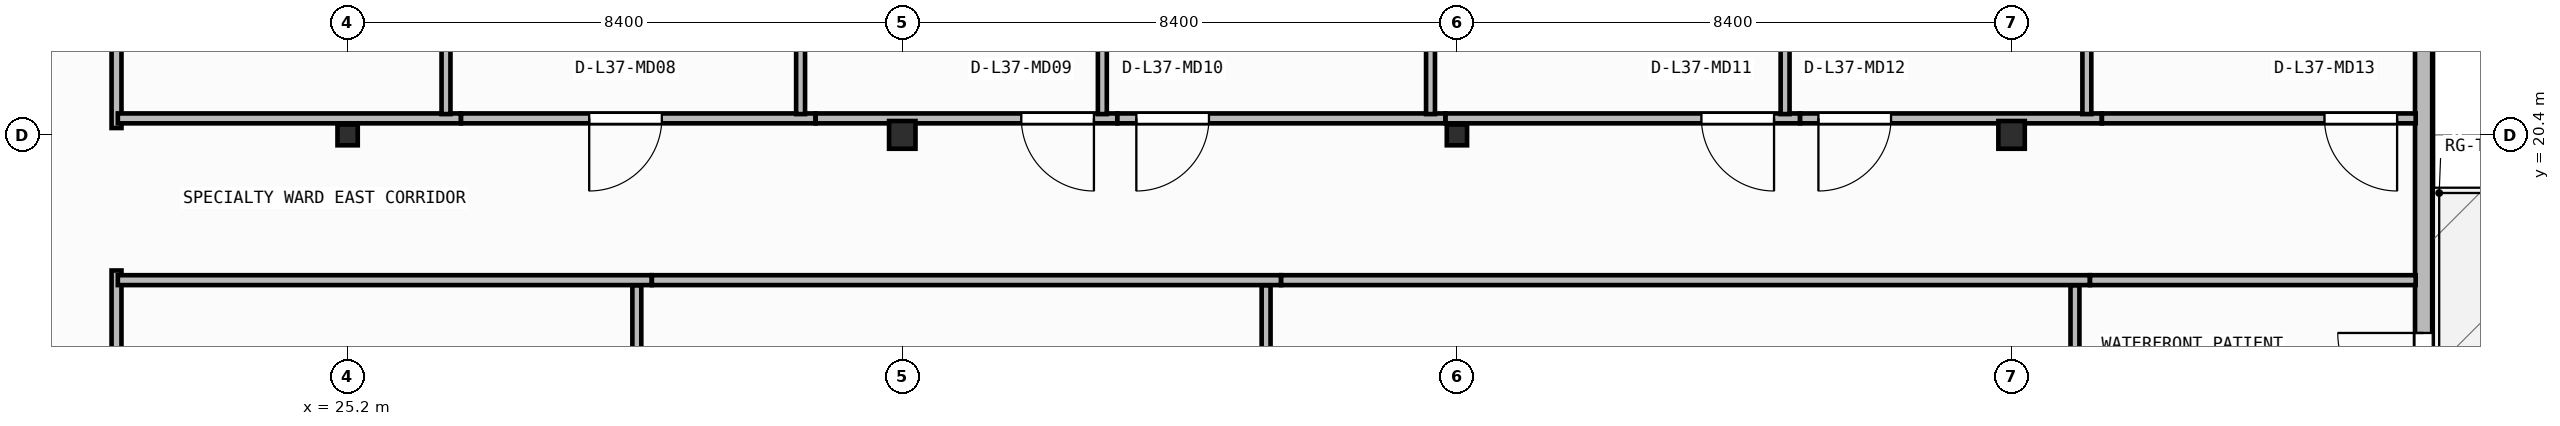
"""IFC4 building model, lengths in metres.
Left out: names, types, materials, properties, quantities, classifications, styles, units other than length and angle.
Written with IfcOpenShell. Run it as: python <this file> out.ifc"""

import sys

from ifc_helpers import new_model, si_unit, direction, frame, frame_2d, origin, origin_2d, place, context, subcontext, project, spatial, rectangle, i_section, extrude, element, fill, save


model = new_model("IFC4")
c1 = context("Model", 3, precision=1e-05, world=origin(), true_north=direction((0.0, 1.0)))
c2 = subcontext(c1, "Body", "Model", "MODEL_VIEW")
j1 = project(units=[si_unit("LENGTHUNIT", "METRE"), si_unit("PLANEANGLEUNIT", "RADIAN")], contexts=[c1])
p1 = place(None, origin())
s1 = spatial("IfcSite", under=j1, at=p1, CompositionType="ELEMENT")
p2 = place(p1, origin())
s2 = spatial("IfcBuilding", under=s1, at=p2, CompositionType="ELEMENT")
p3 = place(p2, frame((0.0, 0.0, 150.75)))
s3 = spatial("IfcBuildingStorey", under=s2, at=p3, CompositionType="ELEMENT", Elevation=150.75)
p4 = place(p3, frame((25.2, 20.4, 0.0), z_axis=(0.0, 0.0, 1.0), x_axis=(1.0, 0.0, 0.0)))
e1 = element("IfcColumn", 1, at=p4, inside=s3, PredefinedType="COLUMN", context=c2, shape_type="SweptSolid", body=[
    extrude(i_section(OverallWidth=0.307, OverallDepth=0.315, WebThickness=0.012, FlangeThickness=0.019, FilletRadius=0.017, at=origin_2d()), origin(), (0.0, 0.0, 1.0), 3.95),
])
p5 = place(p3, frame((33.6, 20.4, 0.0), z_axis=(0.0, 0.0, 1.0), x_axis=(1.0, 0.0, 0.0)))
e2 = element("IfcColumn", 2, at=p5, inside=s3, PredefinedType="COLUMN", context=c2, shape_type="SweptSolid", body=[
    extrude(i_section(OverallWidth=0.4, OverallDepth=0.42, WebThickness=0.025, FlangeThickness=0.04, at=origin_2d()), origin(), (0.0, 0.0, 1.0), 3.95),
])
p6 = place(p3, frame((42.0, 20.4, 0.0), z_axis=(0.0, 0.0, 1.0), x_axis=(1.0, 0.0, 0.0)))
e3 = element("IfcColumn", 3, at=p6, inside=s3, PredefinedType="COLUMN", context=c2, shape_type="SweptSolid", body=[
    extrude(i_section(OverallWidth=0.307, OverallDepth=0.315, WebThickness=0.012, FlangeThickness=0.019, FilletRadius=0.017, at=origin_2d()), origin(), (0.0, 0.0, 1.0), 3.95),
])
p7 = place(p3, frame((50.4, 20.4, 0.0), z_axis=(0.0, 0.0, 1.0), x_axis=(1.0, 0.0, 0.0)))
e4 = element("IfcColumn", 4, at=p7, inside=s3, PredefinedType="COLUMN", context=c2, shape_type="SweptSolid", body=[
    extrude(i_section(OverallWidth=0.4, OverallDepth=0.42, WebThickness=0.025, FlangeThickness=0.04, at=origin_2d()), origin(), (0.0, 0.0, 1.0), 3.95),
])
p8 = place(p3, frame((56.64, 6.86, 0.0), z_axis=(0.0, 0.0, 1.0), x_axis=(0.0, 1.0, 0.0)))
e5 = element("IfcWall", 5, at=p8, inside=s3, PredefinedType="STANDARD", context=c2, shape_type="SweptSolid", body=[
    extrude(rectangle(XDim=23.48, YDim=0.26, at=frame_2d((11.74, 0.0))), origin(), (0.0, 0.0, 1.0), 3.71),
])
p9 = place(p8, frame((9.24, 0.0, 0.0)))
e6 = element("IfcOpeningElement", 6, at=p9, cuts=e5, PredefinedType="OPENING", context=c2, shape_type="SweptSolid", body=[
    extrude(rectangle(XDim=1.3, YDim=2.15, at=frame_2d((0.65, 1.075))), frame((0.0, 0.14, 0.0), z_axis=(0.0, -1.0, 0.0), x_axis=(1.0, 0.0, 0.0)), (0.0, 0.0, 1.0), 0.28),
])
p10 = place(p3, frame((21.7, 14.7, 0.0), z_axis=(0.0, 0.0, 1.0), x_axis=(0.0, 1.0, 0.0)))
e7 = element("IfcWall", 7, at=p10, inside=s3, PredefinedType="PARTITIONING", context=c2, shape_type="SweptSolid", body=[
    extrude(rectangle(XDim=3.646, YDim=0.15, at=frame_2d((1.823, 0.0))), origin(), (0.0, 0.0, 1.0), 3.71),
])
p11 = place(p3, frame((21.7, 20.504, 0.0), z_axis=(0.0, 0.0, 1.0), x_axis=(0.0, 1.0, 0.0)))
e8 = element("IfcWall", 8, at=p11, inside=s3, PredefinedType="PARTITIONING", context=c2, shape_type="SweptSolid", body=[
    extrude(rectangle(XDim=6.756, YDim=0.15, at=frame_2d((3.378, 0.0))), origin(), (0.0, 0.0, 1.0), 3.71),
])
p12 = place(p11, frame((2.828, 0.0, 0.0)))
e9 = element("IfcOpeningElement", 9, at=p12, cuts=e8, PredefinedType="OPENING", context=c2, shape_type="SweptSolid", body=[
    extrude(rectangle(XDim=1.1, YDim=2.1, at=frame_2d((0.55, 1.05))), frame((0.0, 0.085, 0.0), z_axis=(0.0, -1.0, 0.0), x_axis=(1.0, 0.0, 0.0)), (0.0, 0.0, 1.0), 0.17),
])
p13 = place(p3, frame((21.72, 18.2, 0.0), z_axis=(0.0, 0.0, 1.0), x_axis=(1.0, 0.0, 0.0)))
e10 = element("IfcWall", 10, at=p13, inside=s3, PredefinedType="PARTITIONING", context=c2, shape_type="SweptSolid", body=[
    extrude(rectangle(XDim=8.086, YDim=0.15, at=frame_2d((4.043, 0.0))), origin(), (0.0, 0.0, 1.0), 3.71),
])
p14 = place(p3, frame((29.808, 18.2, 0.0), z_axis=(0.0, 0.0, 1.0), x_axis=(1.0, 0.0, 0.0)))
e11 = element("IfcWall", 11, at=p14, inside=s3, PredefinedType="PARTITIONING", context=c2, shape_type="SweptSolid", body=[
    extrude(rectangle(XDim=9.528, YDim=0.15, at=frame_2d((4.764, 0.0))), origin(), (0.0, 0.0, 1.0), 3.71),
])
p15 = place(p3, frame((39.338, 18.2, 0.0), z_axis=(0.0, 0.0, 1.0), x_axis=(1.0, 0.0, 0.0)))
e12 = element("IfcWall", 12, at=p15, inside=s3, PredefinedType="PARTITIONING", context=c2, shape_type="SweptSolid", body=[
    extrude(rectangle(XDim=12.248, YDim=0.15, at=frame_2d((6.124, 0.0))), origin(), (0.0, 0.0, 1.0), 3.71),
])
p16 = place(p3, frame((51.588, 18.2, 0.0), z_axis=(0.0, 0.0, 1.0), x_axis=(1.0, 0.0, 0.0)))
e13 = element("IfcWall", 13, at=p16, inside=s3, PredefinedType="PARTITIONING", context=c2, shape_type="SweptSolid", body=[
    extrude(rectangle(XDim=4.932, YDim=0.15, at=frame_2d((2.466, 0.0))), origin(), (0.0, 0.0, 1.0), 3.71),
])
p17 = place(p3, frame((26.916, 20.65, 0.0), z_axis=(0.0, 0.0, 1.0), x_axis=(-1.0, 0.0, 0.0)))
e14 = element("IfcWall", 14, at=p17, inside=s3, PredefinedType="PARTITIONING", context=c2, shape_type="SweptSolid", body=[
    extrude(rectangle(XDim=5.196, YDim=0.15, at=frame_2d((2.598, 0.0))), origin(), (0.0, 0.0, 1.0), 3.083),
])
p18 = place(p3, frame((32.286, 20.65, 0.0), z_axis=(0.0, 0.0, 1.0), x_axis=(-1.0, 0.0, 0.0)))
e15 = element("IfcWall", 15, at=p18, inside=s3, PredefinedType="PARTITIONING", context=c2, shape_type="SweptSolid", body=[
    extrude(rectangle(XDim=5.368, YDim=0.15, at=frame_2d((2.684, 0.0))), origin(), (0.0, 0.0, 1.0), 3.083),
])
p19 = place(p18, frame((2.327, 0.0, 0.0)))
e16 = element("IfcOpeningElement", 16, at=p19, cuts=e15, PredefinedType="OPENING", context=c2, shape_type="SweptSolid", body=[
    extrude(rectangle(XDim=1.1, YDim=2.1, at=frame_2d((0.55, 1.05))), frame((0.0, 0.085, 0.0), z_axis=(0.0, -1.0, 0.0), x_axis=(1.0, 0.0, 0.0)), (0.0, 0.0, 1.0), 0.17),
])
p20 = place(p3, frame((36.856, 20.65, 0.0), z_axis=(0.0, 0.0, 1.0), x_axis=(-1.0, 0.0, 0.0)))
e17 = element("IfcWall", 17, at=p20, inside=s3, PredefinedType="PARTITIONING", context=c2, shape_type="SweptSolid", body=[
    extrude(rectangle(XDim=4.568, YDim=0.15, at=frame_2d((2.284, 0.0))), origin(), (0.0, 0.0, 1.0), 3.083),
])
p21 = place(p20, frame((0.354, 0.0, 0.0)))
e18 = element("IfcOpeningElement", 18, at=p21, cuts=e17, PredefinedType="OPENING", context=c2, shape_type="SweptSolid", body=[
    extrude(rectangle(XDim=1.1, YDim=2.1, at=frame_2d((0.55, 1.05))), frame((0.0, 0.085, 0.0), z_axis=(0.0, -1.0, 0.0), x_axis=(1.0, 0.0, 0.0)), (0.0, 0.0, 1.0), 0.17),
])
p22 = place(p3, frame((41.826, 20.65, 0.0), z_axis=(0.0, 0.0, 1.0), x_axis=(-1.0, 0.0, 0.0)))
e19 = element("IfcWall", 19, at=p22, inside=s3, PredefinedType="PARTITIONING", context=c2, shape_type="SweptSolid", body=[
    extrude(rectangle(XDim=4.968, YDim=0.15, at=frame_2d((2.484, 0.0))), origin(), (0.0, 0.0, 1.0), 3.083),
])
p23 = place(p22, frame((3.581, 0.0, 0.0)))
e20 = element("IfcOpeningElement", 20, at=p23, cuts=e19, PredefinedType="OPENING", context=c2, shape_type="SweptSolid", body=[
    extrude(rectangle(XDim=1.1, YDim=2.1, at=frame_2d((0.55, 1.05))), frame((0.0, 0.085, 0.0), z_axis=(0.0, -1.0, 0.0), x_axis=(1.0, 0.0, 0.0)), (0.0, 0.0, 1.0), 0.17),
])
p24 = place(p3, frame((47.196, 20.65, 0.0), z_axis=(0.0, 0.0, 1.0), x_axis=(-1.0, 0.0, 0.0)))
e21 = element("IfcWall", 21, at=p24, inside=s3, PredefinedType="PARTITIONING", context=c2, shape_type="SweptSolid", body=[
    extrude(rectangle(XDim=5.368, YDim=0.15, at=frame_2d((2.684, 0.0))), origin(), (0.0, 0.0, 1.0), 3.083),
])
p25 = place(p24, frame((0.393, 0.0, 0.0)))
e22 = element("IfcOpeningElement", 22, at=p25, cuts=e21, PredefinedType="OPENING", context=c2, shape_type="SweptSolid", body=[
    extrude(rectangle(XDim=1.1, YDim=2.1, at=frame_2d((0.55, 1.05))), frame((0.0, 0.085, 0.0), z_axis=(0.0, -1.0, 0.0), x_axis=(1.0, 0.0, 0.0)), (0.0, 0.0, 1.0), 0.17),
])
p26 = place(p3, frame((51.766, 20.65, 0.0), z_axis=(0.0, 0.0, 1.0), x_axis=(-1.0, 0.0, 0.0)))
e23 = element("IfcWall", 23, at=p26, inside=s3, PredefinedType="PARTITIONING", context=c2, shape_type="SweptSolid", body=[
    extrude(rectangle(XDim=4.568, YDim=0.15, at=frame_2d((2.284, 0.0))), origin(), (0.0, 0.0, 1.0), 3.083),
])
p27 = place(p26, frame((3.191, 0.0, 0.0)))
e24 = element("IfcOpeningElement", 24, at=p27, cuts=e23, PredefinedType="OPENING", context=c2, shape_type="SweptSolid", body=[
    extrude(rectangle(XDim=1.1, YDim=2.1, at=frame_2d((0.55, 1.05))), frame((0.0, 0.085, 0.0), z_axis=(0.0, -1.0, 0.0), x_axis=(1.0, 0.0, 0.0)), (0.0, 0.0, 1.0), 0.17),
])
p28 = place(p3, frame((56.52, 20.65, 0.0), z_axis=(0.0, 0.0, 1.0), x_axis=(-1.0, 0.0, 0.0)))
e25 = element("IfcWall", 25, at=p28, inside=s3, PredefinedType="PARTITIONING", context=c2, shape_type="SweptSolid", body=[
    extrude(rectangle(XDim=4.752, YDim=0.15, at=frame_2d((2.376, 0.0))), origin(), (0.0, 0.0, 1.0), 3.71),
])
p29 = place(p28, frame((0.281, 0.0, 0.0)))
e26 = element("IfcOpeningElement", 26, at=p29, cuts=e25, PredefinedType="OPENING", context=c2, shape_type="SweptSolid", body=[
    extrude(rectangle(XDim=1.1, YDim=2.1, at=frame_2d((0.55, 1.05))), frame((0.0, 0.085, 0.0), z_axis=(0.0, -1.0, 0.0), x_axis=(1.0, 0.0, 0.0)), (0.0, 0.0, 1.0), 0.17),
])
for number, where, z_axis, x_axis in (
    (27, (29.58, 14.76, 0.0), (0.0, 0.0, 1.0), (0.0, 1.0, 0.0)),
    (28, (39.11, 14.76, 0.0), (0.0, 0.0, 1.0), (0.0, 1.0, 0.0)),
    (29, (51.36, 14.76, 0.0), (0.0, 0.0, 1.0), (0.0, 1.0, 0.0)),
):
    element("IfcWall", number, at=place(p3, frame(where, z_axis=z_axis, x_axis=x_axis)), inside=s3, PredefinedType="PARTITIONING", context=c2, shape_type="SweptSolid", body=[
        extrude(rectangle(XDim=3.36, YDim=0.135, at=frame_2d((1.68, 0.0))), origin(), (0.0, 0.0, 1.0), 3.71),
    ])
for number, where, z_axis, x_axis in (
    (30, (26.69, 20.715, 0.0), (0.0, 0.0, 1.0), (0.0, 1.0, 0.0)),
    (31, (32.06, 20.715, 0.0), (0.0, 0.0, 1.0), (0.0, 1.0, 0.0)),
    (32, (36.63, 20.715, 0.0), (0.0, 0.0, 1.0), (0.0, 1.0, 0.0)),
):
    element("IfcWall", number, at=place(p3, frame(where, z_axis=z_axis, x_axis=x_axis)), inside=s3, PredefinedType="PARTITIONING", context=c2, shape_type="SweptSolid", body=[
        extrude(rectangle(XDim=6.385, YDim=0.135, at=frame_2d((3.192, 0.0))), origin(), (0.0, 0.0, 1.0), 3.71),
    ])
p30 = place(p3, frame((41.6, 20.715, 0.0), z_axis=(0.0, 0.0, 1.0), x_axis=(0.0, 1.0, 0.0)))
e33 = element("IfcWall", 33, at=p30, inside=s3, PredefinedType="PARTITIONING", context=c2, shape_type="SweptSolid", body=[
    extrude(rectangle(XDim=6.385, YDim=0.135, at=frame_2d((3.192, 0.0))), origin(), (0.0, 0.0, 1.0), 3.152),
])
for number, where, z_axis, x_axis in (
    (34, (46.97, 20.715, 0.0), (0.0, 0.0, 1.0), (0.0, 1.0, 0.0)),
    (35, (51.54, 20.715, 0.0), (0.0, 0.0, 1.0), (0.0, 1.0, 0.0)),
):
    element("IfcWall", number, at=place(p3, frame(where, z_axis=z_axis, x_axis=x_axis)), inside=s3, PredefinedType="PARTITIONING", context=c2, shape_type="SweptSolid", body=[
        extrude(rectangle(XDim=6.385, YDim=0.135, at=frame_2d((3.192, 0.0))), origin(), (0.0, 0.0, 1.0), 3.71),
    ])
p31 = place(p9, origin())
e36 = element("IfcDoor", 36, at=p31, inside=s3, OperationType="SINGLE_SWING_RIGHT", PredefinedType="DOOR", context=c2, shape_type="SweptSolid", body=[
    extrude(rectangle(XDim=1.3, YDim=2.15, at=frame_2d((0.65, 1.075))), frame((0.0, 0.025, 0.0), z_axis=(0.0, -1.0, 0.0), x_axis=(1.0, 0.0, 0.0)), (0.0, 0.0, 1.0), 0.05),
])
fill(e6, e36)
p32 = place(p19, origin())
e37 = element("IfcDoor", 37, at=p32, inside=s3, OperationType="SINGLE_SWING_RIGHT", PredefinedType="DOOR", context=c2, shape_type="SweptSolid", body=[
    extrude(rectangle(XDim=1.1, YDim=2.1, at=frame_2d((0.55, 1.05))), frame((0.0, 0.025, 0.0), z_axis=(0.0, -1.0, 0.0), x_axis=(1.0, 0.0, 0.0)), (0.0, 0.0, 1.0), 0.05),
])
fill(e16, e37)
p33 = place(p21, origin())
e38 = element("IfcDoor", 38, at=p33, inside=s3, OperationType="SINGLE_SWING_LEFT", PredefinedType="DOOR", context=c2, shape_type="SweptSolid", body=[
    extrude(rectangle(XDim=1.1, YDim=2.1, at=frame_2d((0.55, 1.05))), frame((0.0, 0.025, 0.0), z_axis=(0.0, -1.0, 0.0), x_axis=(1.0, 0.0, 0.0)), (0.0, 0.0, 1.0), 0.05),
])
fill(e18, e38)
p34 = place(p23, origin())
e39 = element("IfcDoor", 39, at=p34, inside=s3, OperationType="SINGLE_SWING_RIGHT", PredefinedType="DOOR", context=c2, shape_type="SweptSolid", body=[
    extrude(rectangle(XDim=1.1, YDim=2.1, at=frame_2d((0.55, 1.05))), frame((0.0, 0.025, 0.0), z_axis=(0.0, -1.0, 0.0), x_axis=(1.0, 0.0, 0.0)), (0.0, 0.0, 1.0), 0.05),
])
fill(e20, e39)
p35 = place(p25, origin())
e40 = element("IfcDoor", 40, at=p35, inside=s3, OperationType="SINGLE_SWING_LEFT", PredefinedType="DOOR", context=c2, shape_type="SweptSolid", body=[
    extrude(rectangle(XDim=1.1, YDim=2.1, at=frame_2d((0.55, 1.05))), frame((0.0, 0.025, 0.0), z_axis=(0.0, -1.0, 0.0), x_axis=(1.0, 0.0, 0.0)), (0.0, 0.0, 1.0), 0.05),
])
fill(e22, e40)
p36 = place(p27, origin())
e41 = element("IfcDoor", 41, at=p36, inside=s3, OperationType="SINGLE_SWING_RIGHT", PredefinedType="DOOR", context=c2, shape_type="SweptSolid", body=[
    extrude(rectangle(XDim=1.1, YDim=2.1, at=frame_2d((0.55, 1.05))), frame((0.0, 0.025, 0.0), z_axis=(0.0, -1.0, 0.0), x_axis=(1.0, 0.0, 0.0)), (0.0, 0.0, 1.0), 0.05),
])
fill(e24, e41)
p37 = place(p29, origin())
e42 = element("IfcDoor", 42, at=p37, inside=s3, OperationType="SINGLE_SWING_LEFT", PredefinedType="DOOR", context=c2, shape_type="SweptSolid", body=[
    extrude(rectangle(XDim=1.1, YDim=2.1, at=frame_2d((0.55, 1.05))), frame((0.0, 0.025, 0.0), z_axis=(0.0, -1.0, 0.0), x_axis=(1.0, 0.0, 0.0)), (0.0, 0.0, 1.0), 0.05),
])
fill(e26, e42)
save(model, sys.argv[1])
